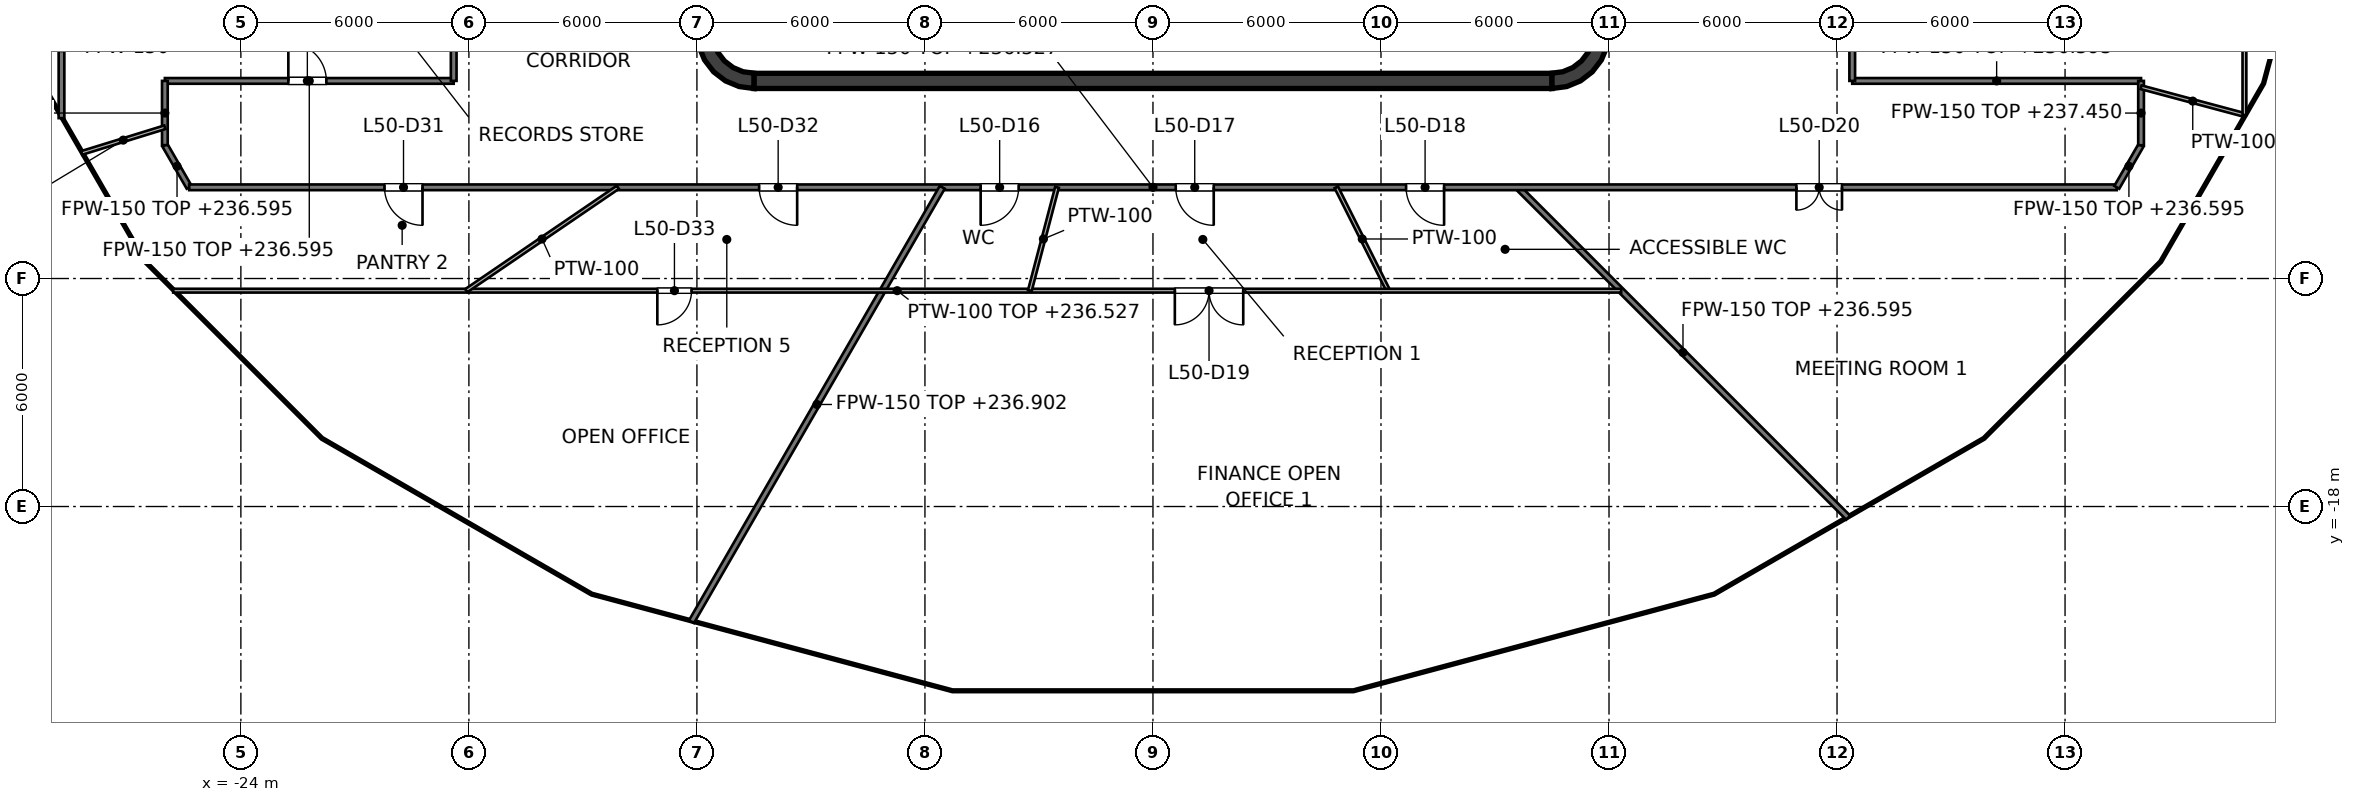
"""IFC4 building model, lengths in metres.
Left out: names, types, materials, properties, quantities, classifications, styles, units other than length and angle.
Written with IfcOpenShell. Run it as: python <this file> out.ifc"""

import sys

from ifc_helpers import new_model, si_unit, direction, frame, frame_2d, origin, place, context, subcontext, project, spatial, polyline, rectangle, outline, extrude, element, fill, save


model = new_model("IFC4")
c1 = context("Model", 3, precision=1e-05, world=origin(), true_north=direction((0.0, 1.0)))
c2 = subcontext(c1, "Body", "Model", "MODEL_VIEW")
j1 = project(units=[si_unit("LENGTHUNIT", "METRE"), si_unit("PLANEANGLEUNIT", "RADIAN")], contexts=[c1])
p1 = place(None, origin())
s1 = spatial("IfcSite", under=j1, at=p1, CompositionType="ELEMENT")
p2 = place(p1, origin())
s2 = spatial("IfcBuilding", under=s1, at=p2, CompositionType="ELEMENT")
p3 = place(p2, frame((0.0, 0.0, 233.6)))
s3 = spatial("IfcBuildingStorey", under=s2, at=p3, CompositionType="ELEMENT", Elevation=233.6)
p4 = place(p3, frame((-10.5, -6.8, 0.0), z_axis=(0.0, 0.0, 1.0), x_axis=(1.0, 0.0, 0.0)))
e1 = element("IfcWall", 1, at=p4, inside=s3, PredefinedType="SHEAR", context=c2, shape_type="SweptSolid", body=[
    extrude(rectangle(XDim=21.0, YDim=0.4, at=frame_2d((10.5, 0.0))), origin(), (0.0, 0.0, 1.0), 4.0),
])
p5 = place(p3, origin())
e2 = element("IfcWall", 2, at=p5, inside=s3, PredefinedType="SHEAR", context=c2, shape_type="SweptSolid", body=[
    extrude(outline(polyline([(-10.5, -7.0), (-10.5, -6.596), (-10.784, -6.559), (-11.048, -6.45), (-11.275, -6.275), (-11.45, -6.048), (-11.559, -5.784), (-11.596, -5.5), (-12.0, -5.5), (-11.949, -5.888), (-11.799, -6.25), (-11.561, -6.561), (-11.25, -6.799), (-10.888, -6.949), (-10.5, -7.0)])), origin(), (0.0, 0.0, 1.0), 4.0),
])
e3 = element("IfcWall", 3, at=p5, inside=s3, PredefinedType="SHEAR", context=c2, shape_type="SweptSolid", body=[
    extrude(outline(polyline([(12.0, -5.5), (11.596, -5.5), (11.559, -5.784), (11.45, -6.048), (11.275, -6.275), (11.048, -6.45), (10.784, -6.559), (10.5, -6.596), (10.5, -7.0), (10.888, -6.949), (11.25, -6.799), (11.561, -6.561), (11.799, -6.25), (11.949, -5.888), (12.0, -5.5)])), origin(), (0.0, 0.0, 1.0), 4.0),
])
p6 = place(p3, frame((9.0, -6.6, 0.0), z_axis=(0.0, 0.0, 1.0), x_axis=(0.0, 1.0, 0.0)))
e4 = element("IfcWall", 4, at=p6, inside=s3, PredefinedType="SOLIDWALL", context=c2, shape_type="SweptSolid", body=[
    extrude(rectangle(XDim=2.5, YDim=0.25, at=frame_2d((1.25, 0.0))), origin(), (0.0, 0.0, 1.0), 3.85),
])
p7 = place(p6, frame((0.65, 0.0, 0.0)))
e5 = element("IfcOpeningElement", 5, at=p7, cuts=e4, PredefinedType="OPENING", context=c2, shape_type="SweptSolid", body=[
    extrude(rectangle(XDim=1.2, YDim=2.1, at=frame_2d((0.6, 1.05))), frame((0.0, 0.125, 0.0), z_axis=(0.0, -1.0, 0.0), x_axis=(1.0, 0.0, 0.0)), (0.0, 0.0, 1.0), 0.25),
])
p8 = place(p3, frame((-9.0, -6.6, 0.0), z_axis=(0.0, 0.0, 1.0), x_axis=(0.0, 1.0, 0.0)))
e6 = element("IfcWall", 6, at=p8, inside=s3, PredefinedType="PARTITIONING", context=c2, shape_type="SweptSolid", body=[
    extrude(rectangle(XDim=2.5, YDim=0.25, at=frame_2d((1.25, 0.0))), origin(), (0.0, 0.0, 1.0), 3.85),
])
p9 = place(p8, frame((0.75, 0.0, 0.0)))
e7 = element("IfcOpeningElement", 7, at=p9, cuts=e6, PredefinedType="OPENING", context=c2, shape_type="SweptSolid", body=[
    extrude(rectangle(XDim=1.0, YDim=2.1, at=frame_2d((0.5, 1.05))), frame((0.0, 0.125, 0.0), z_axis=(0.0, -1.0, 0.0), x_axis=(1.0, 0.0, 0.0)), (0.0, 0.0, 1.0), 0.25),
])
p10 = place(p3, frame((3.15, -6.6, 0.0), z_axis=(0.0, 0.0, 1.0), x_axis=(0.0, 1.0, 0.0)))
e8 = element("IfcWall", 8, at=p10, inside=s3, PredefinedType="SOLIDWALL", context=c2, shape_type="SweptSolid", body=[
    extrude(rectangle(XDim=2.5, YDim=0.25, at=frame_2d((1.25, 0.0))), origin(), (0.0, 0.0, 1.0), 3.85),
])
p11 = place(p3, frame((-2.9, -6.6, 0.0), z_axis=(0.0, 0.0, 1.0), x_axis=(0.0, 1.0, 0.0)))
e9 = element("IfcWall", 9, at=p11, inside=s3, PredefinedType="PARTITIONING", context=c2, shape_type="SweptSolid", body=[
    extrude(rectangle(XDim=2.5, YDim=0.25, at=frame_2d((1.25, 0.0))), origin(), (0.0, 0.0, 1.0), 3.85),
])
p12 = place(p11, frame((0.8, 0.0, 0.0)))
e10 = element("IfcOpeningElement", 10, at=p12, cuts=e9, PredefinedType="OPENING", context=c2, shape_type="SweptSolid", body=[
    extrude(rectangle(XDim=0.9, YDim=2.1, at=frame_2d((0.45, 1.05))), frame((0.0, 0.125, 0.0), z_axis=(0.0, -1.0, 0.0), x_axis=(1.0, 0.0, 0.0)), (0.0, 0.0, 1.0), 0.25),
])
p13 = place(p3, frame((-26.0, -8.491, 0.0), z_axis=(0.0, 0.0, 1.0), x_axis=(0.499870984138, -0.866099878315, 0.0)))
e11 = element("IfcWall", 11, at=p13, inside=s3, PredefinedType="PARTITIONING", context=c2, shape_type="SweptSolid", body=[
    extrude(rectangle(XDim=1.281, YDim=0.15, at=frame_2d((0.64, 0.0))), origin(), (0.0, 0.0, 1.0), 2.995),
])
p14 = place(p3, frame((9.6, -9.6, 0.0), z_axis=(0.0, 0.0, 1.0), x_axis=(0.707106781187, -0.707106781187, 0.0)))
e12 = element("IfcWall", 12, at=p14, inside=s3, PredefinedType="PARTITIONING", context=c2, shape_type="SweptSolid", body=[
    extrude(rectangle(XDim=12.293, YDim=0.15, at=frame_2d((6.147, 0.0))), origin(), (0.0, 0.0, 1.0), 2.995),
])
p15 = place(p3, frame((-25.36, -9.6, 0.0), z_axis=(0.0, 0.0, 1.0), x_axis=(1.0, 0.0, 0.0)))
e13 = element("IfcWall", 13, at=p15, inside=s3, PredefinedType="PARTITIONING", context=c2, shape_type="SweptSolid", body=[
    extrude(rectangle(XDim=50.721, YDim=0.15, at=frame_2d((25.361, 0.0))), origin(), (0.0, 0.0, 1.0), 2.927),
])
p16 = place(p15, frame((20.826, 0.0, 0.0)))
e14 = element("IfcOpeningElement", 14, at=p16, cuts=e13, PredefinedType="OPENING", context=c2, shape_type="SweptSolid", body=[
    extrude(rectangle(XDim=1.0, YDim=2.1, at=frame_2d((0.5, 1.05))), frame((0.0, 0.075, 0.0), z_axis=(0.0, -1.0, 0.0), x_axis=(1.0, 0.0, 0.0)), (0.0, 0.0, 1.0), 0.15),
])
p17 = place(p15, frame((25.959, 0.0, 0.0)))
e15 = element("IfcOpeningElement", 15, at=p17, cuts=e13, PredefinedType="OPENING", context=c2, shape_type="SweptSolid", body=[
    extrude(rectangle(XDim=1.0, YDim=2.1, at=frame_2d((0.5, 1.05))), frame((0.0, 0.075, 0.0), z_axis=(0.0, -1.0, 0.0), x_axis=(1.0, 0.0, 0.0)), (0.0, 0.0, 1.0), 0.15),
])
p18 = place(p15, frame((32.021, 0.0, 0.0)))
e16 = element("IfcOpeningElement", 16, at=p18, cuts=e13, PredefinedType="OPENING", context=c2, shape_type="SweptSolid", body=[
    extrude(rectangle(XDim=1.0, YDim=2.1, at=frame_2d((0.5, 1.05))), frame((0.0, 0.075, 0.0), z_axis=(0.0, -1.0, 0.0), x_axis=(1.0, 0.0, 0.0)), (0.0, 0.0, 1.0), 0.15),
])
p19 = place(p15, frame((42.291, 0.0, 0.0)))
e17 = element("IfcOpeningElement", 17, at=p19, cuts=e13, PredefinedType="OPENING", context=c2, shape_type="SweptSolid", body=[
    extrude(rectangle(XDim=1.2, YDim=2.1, at=frame_2d((0.6, 1.05))), frame((0.0, 0.075, 0.0), z_axis=(0.0, -1.0, 0.0), x_axis=(1.0, 0.0, 0.0)), (0.0, 0.0, 1.0), 0.15),
])
p20 = place(p15, frame((5.139, 0.0, 0.0)))
e18 = element("IfcOpeningElement", 18, at=p20, cuts=e13, PredefinedType="OPENING", context=c2, shape_type="SweptSolid", body=[
    extrude(rectangle(XDim=1.0, YDim=2.1, at=frame_2d((0.5, 1.05))), frame((0.0, 0.075, 0.0), z_axis=(0.0, -1.0, 0.0), x_axis=(1.0, 0.0, 0.0)), (0.0, 0.0, 1.0), 0.15),
])
p21 = place(p15, frame((14.998, 0.0, 0.0)))
e19 = element("IfcOpeningElement", 19, at=p21, cuts=e13, PredefinedType="OPENING", context=c2, shape_type="SweptSolid", body=[
    extrude(rectangle(XDim=1.0, YDim=2.1, at=frame_2d((0.5, 1.05))), frame((0.0, 0.075, 0.0), z_axis=(0.0, -1.0, 0.0), x_axis=(1.0, 0.0, 0.0)), (0.0, 0.0, 1.0), 0.15),
])
p22 = place(p3, frame((-26.0, -6.8, 0.0), z_axis=(0.0, 0.0, 1.0), x_axis=(1.0, 0.0, 0.0)))
e20 = element("IfcWall", 20, at=p22, inside=s3, PredefinedType="PARTITIONING", context=c2, shape_type="SweptSolid", body=[
    extrude(rectangle(XDim=7.6, YDim=0.15, at=frame_2d((3.8, 0.0))), origin(), (0.0, 0.0, 1.0), 2.995),
])
p23 = place(p22, frame((3.249, 0.0, 0.0)))
e21 = element("IfcOpeningElement", 21, at=p23, cuts=e20, PredefinedType="OPENING", context=c2, shape_type="SweptSolid", body=[
    extrude(rectangle(XDim=1.0, YDim=2.1, at=frame_2d((0.5, 1.05))), frame((0.0, 0.075, 0.0), z_axis=(0.0, -1.0, 0.0), x_axis=(1.0, 0.0, 0.0)), (0.0, 0.0, 1.0), 0.15),
])
p24 = place(p3, frame((18.4, -6.8, 0.0), z_axis=(0.0, 0.0, 1.0), x_axis=(1.0, 0.0, 0.0)))
e22 = element("IfcWall", 22, at=p24, inside=s3, PredefinedType="PARTITIONING", context=c2, shape_type="SweptSolid", body=[
    extrude(rectangle(XDim=7.6, YDim=0.15, at=frame_2d((3.8, 0.0))), origin(), (0.0, 0.0, 1.0), 2.995),
])
p25 = place(p3, frame((25.361, -9.6, 0.0), z_axis=(0.0, 0.0, 1.0), x_axis=(0.499816142895, 0.866131527715, 0.0)))
e23 = element("IfcWall", 23, at=p25, inside=s3, PredefinedType="PARTITIONING", context=c2, shape_type="SweptSolid", body=[
    extrude(rectangle(XDim=1.278, YDim=0.15, at=frame_2d((0.639, 0.0))), origin(), (0.0, 0.0, 1.0), 2.995),
])
p26 = place(p3, frame((-12.142, -21.03, 0.0), z_axis=(0.0, 0.0, 1.0), x_axis=(0.499931154021, 0.86606514838, 0.0)))
e24 = element("IfcWall", 24, at=p26, inside=s3, PredefinedType="PARTITIONING", context=c2, shape_type="SweptSolid", body=[
    extrude(rectangle(XDim=13.198, YDim=0.15, at=frame_2d((6.599, 0.0))), origin(), (0.0, 0.0, 1.0), 3.302),
])
p27 = place(p3, frame((26.0, -8.493, 0.0), z_axis=(0.0, 0.0, 1.0), x_axis=(0.0, 1.0, 0.0)))
e25 = element("IfcWall", 25, at=p27, inside=s3, PredefinedType="PARTITIONING", context=c2, shape_type="SweptSolid", body=[
    extrude(rectangle(XDim=1.693, YDim=0.15, at=frame_2d((0.846, 0.0))), origin(), (0.0, 0.0, 1.0), 3.85),
])
p28 = place(p3, frame((18.4, -6.8, 0.0), z_axis=(0.0, 0.0, 1.0), x_axis=(0.0, 1.0, 0.0)))
e26 = element("IfcWall", 26, at=p28, inside=s3, PredefinedType="PARTITIONING", context=c2, shape_type="SweptSolid", body=[
    extrude(rectangle(XDim=13.6, YDim=0.15, at=frame_2d((6.8, 0.0))), origin(), (0.0, 0.0, 1.0), 2.918),
])
p29 = place(p28, frame((6.2, 0.0, 0.0)))
e27 = element("IfcOpeningElement", 27, at=p29, cuts=e26, PredefinedType="OPENING", context=c2, shape_type="SweptSolid", body=[
    extrude(rectangle(XDim=1.2, YDim=2.1, at=frame_2d((0.6, 1.05))), frame((0.0, 0.075, 0.0), z_axis=(0.0, -1.0, 0.0), x_axis=(1.0, 0.0, 0.0)), (0.0, 0.0, 1.0), 0.15),
])
p30 = place(p3, frame((-18.4, -6.8, 0.0), z_axis=(0.0, 0.0, 1.0), x_axis=(0.0, 1.0, 0.0)))
e28 = element("IfcWall", 28, at=p30, inside=s3, PredefinedType="PARTITIONING", context=c2, shape_type="SweptSolid", body=[
    extrude(rectangle(XDim=13.6, YDim=0.15, at=frame_2d((6.8, 0.0))), origin(), (0.0, 0.0, 1.0), 2.918),
])
p31 = place(p3, frame((-26.0, -8.491, 0.0), z_axis=(0.0, 0.0, 1.0), x_axis=(0.0, 1.0, 0.0)))
e29 = element("IfcWall", 29, at=p31, inside=s3, PredefinedType="PARTITIONING", context=c2, shape_type="SweptSolid", body=[
    extrude(rectangle(XDim=1.691, YDim=0.15, at=frame_2d((0.845, 0.0))), origin(), (0.0, 0.0, 1.0), 3.85),
])
p32 = place(p3, frame((-28.72, -7.78, 0.0), z_axis=(0.0, 0.0, 1.0), x_axis=(0.0, 1.0, 0.0)))
e30 = element("IfcWall", 30, at=p32, inside=s3, PredefinedType="PARTITIONING", context=c2, shape_type="SweptSolid", body=[
    extrude(rectangle(XDim=3.7, YDim=0.15, at=frame_2d((1.85, 0.0))), origin(), (0.0, 0.0, 1.0), 2.918),
])
p33 = place(p3, frame((4.824, -9.6, 0.0), z_axis=(0.0, 0.0, 1.0), x_axis=(0.449041226729, -0.893511038934, 0.0)))
e31 = element("IfcWall", 31, at=p33, inside=s3, PredefinedType="PARTITIONING", context=c2, shape_type="SweptSolid", body=[
    extrude(rectangle(XDim=3.044, YDim=0.1, at=frame_2d((1.522, 0.0))), origin(), (0.0, 0.0, 1.0), 3.85),
])
p34 = place(p3, frame((26.0, -6.967, 0.0), z_axis=(0.0, 0.0, 1.0), x_axis=(0.965908960342, -0.258881981472, 0.0)))
e32 = element("IfcWall", 32, at=p34, inside=s3, PredefinedType="PARTITIONING", context=c2, shape_type="SweptSolid", body=[
    extrude(rectangle(XDim=2.816, YDim=0.1, at=frame_2d((1.408, 0.0))), origin(), (0.0, 0.0, 1.0), 3.527),
])
p35 = place(p3, frame((-25.781, -12.32, 0.0), z_axis=(0.0, 0.0, 1.0), x_axis=(1.0, 0.0, 0.0)))
e33 = element("IfcWall", 33, at=p35, inside=s3, PredefinedType="PARTITIONING", context=c2, shape_type="SweptSolid", body=[
    extrude(rectangle(XDim=38.101, YDim=0.1, at=frame_2d((19.051, 0.0))), origin(), (0.0, 0.0, 1.0), 2.927),
])
p36 = place(p35, frame((26.356, 0.0, 0.0)))
e34 = element("IfcOpeningElement", 34, at=p36, cuts=e33, PredefinedType="OPENING", context=c2, shape_type="SweptSolid", body=[
    extrude(rectangle(XDim=1.8, YDim=2.1, at=frame_2d((0.9, 1.05))), frame((0.0, 0.05, 0.0), z_axis=(0.0, -1.0, 0.0), x_axis=(1.0, 0.0, 0.0)), (0.0, 0.0, 1.0), 0.1),
])
p37 = place(p35, frame((12.74, 0.0, 0.0)))
e35 = element("IfcOpeningElement", 35, at=p37, cuts=e33, PredefinedType="OPENING", context=c2, shape_type="SweptSolid", body=[
    extrude(rectangle(XDim=0.9, YDim=2.1, at=frame_2d((0.45, 1.05))), frame((0.0, 0.05, 0.0), z_axis=(0.0, -1.0, 0.0), x_axis=(1.0, 0.0, 0.0)), (0.0, 0.0, 1.0), 0.1),
])
p38 = place(p3, frame((-28.191, -8.696, 0.0), z_axis=(0.0, 0.0, 1.0), x_axis=(0.955546181959, 0.294841472904, 0.0)))
e36 = element("IfcWall", 36, at=p38, inside=s3, PredefinedType="PARTITIONING", context=c2, shape_type="SweptSolid", body=[
    extrude(rectangle(XDim=2.293, YDim=0.1, at=frame_2d((1.146, 0.0))), origin(), (0.0, 0.0, 1.0), 3.527),
])
p39 = place(p3, frame((-18.07, -12.32, 0.0), z_axis=(0.0, 0.0, 1.0), x_axis=(0.826209155485, 0.563363498455, 0.0)))
e37 = element("IfcWall", 37, at=p39, inside=s3, PredefinedType="PARTITIONING", context=c2, shape_type="SweptSolid", body=[
    extrude(rectangle(XDim=4.828, YDim=0.1, at=frame_2d((2.414, 0.0))), origin(), (0.0, 0.0, 1.0), 3.85),
])
p40 = place(p3, frame((-3.24, -12.32, 0.0), z_axis=(0.0, 0.0, 1.0), x_axis=(0.254262551931, 0.967135230816, 0.0)))
e38 = element("IfcWall", 38, at=p40, inside=s3, PredefinedType="PARTITIONING", context=c2, shape_type="SweptSolid", body=[
    extrude(rectangle(XDim=2.812, YDim=0.1, at=frame_2d((1.406, 0.0))), origin(), (0.0, 0.0, 1.0), 3.85),
])
p41 = place(p3, frame((28.72, -7.696, 0.0), z_axis=(0.0, 0.0, 1.0), x_axis=(0.0, 1.0, 0.0)))
e39 = element("IfcWall", 39, at=p41, inside=s3, PredefinedType="PARTITIONING", context=c2, shape_type="SweptSolid", body=[
    extrude(rectangle(XDim=3.616, YDim=0.1, at=frame_2d((1.808, 0.0))), origin(), (0.0, 0.0, 1.0), 2.918),
])
p42 = place(p16, origin())
e40 = element("IfcDoor", 40, at=p42, inside=s3, OperationType="SINGLE_SWING_LEFT", PredefinedType="DOOR", context=c2, shape_type="SweptSolid", body=[
    extrude(rectangle(XDim=1.0, YDim=2.1, at=frame_2d((0.5, 1.05))), frame((0.0, 0.025, 0.0), z_axis=(0.0, -1.0, 0.0), x_axis=(1.0, 0.0, 0.0)), (0.0, 0.0, 1.0), 0.05),
])
fill(e14, e40)
p43 = place(p17, origin())
e41 = element("IfcDoor", 41, at=p43, inside=s3, OperationType="SINGLE_SWING_RIGHT", PredefinedType="DOOR", context=c2, shape_type="SweptSolid", body=[
    extrude(rectangle(XDim=1.0, YDim=2.1, at=frame_2d((0.5, 1.05))), frame((0.0, 0.025, 0.0), z_axis=(0.0, -1.0, 0.0), x_axis=(1.0, 0.0, 0.0)), (0.0, 0.0, 1.0), 0.05),
])
fill(e15, e41)
p44 = place(p18, origin())
e42 = element("IfcDoor", 42, at=p44, inside=s3, OperationType="SINGLE_SWING_RIGHT", PredefinedType="DOOR", context=c2, shape_type="SweptSolid", body=[
    extrude(rectangle(XDim=1.0, YDim=2.1, at=frame_2d((0.5, 1.05))), frame((0.0, 0.025, 0.0), z_axis=(0.0, -1.0, 0.0), x_axis=(1.0, 0.0, 0.0)), (0.0, 0.0, 1.0), 0.05),
])
fill(e16, e42)
p45 = place(p36, origin())
e43 = element("IfcDoor", 43, at=p45, inside=s3, OperationType="DOUBLE_DOOR_SINGLE_SWING", PredefinedType="DOOR", context=c2, shape_type="SweptSolid", body=[
    extrude(rectangle(XDim=1.8, YDim=2.1, at=frame_2d((0.9, 1.05))), frame((0.0, 0.025, 0.0), z_axis=(0.0, -1.0, 0.0), x_axis=(1.0, 0.0, 0.0)), (0.0, 0.0, 1.0), 0.05),
])
fill(e34, e43)
p46 = place(p19, origin())
e44 = element("IfcDoor", 44, at=p46, inside=s3, OperationType="DOUBLE_DOOR_SINGLE_SWING", PredefinedType="DOOR", context=c2, shape_type="SweptSolid", body=[
    extrude(rectangle(XDim=1.2, YDim=2.1, at=frame_2d((0.6, 1.05))), frame((0.0, 0.025, 0.0), z_axis=(0.0, -1.0, 0.0), x_axis=(1.0, 0.0, 0.0)), (0.0, 0.0, 1.0), 0.05),
])
fill(e17, e44)
p47 = place(p23, origin())
e45 = element("IfcDoor", 45, at=p47, inside=s3, OperationType="SINGLE_SWING_LEFT", PredefinedType="DOOR", context=c2, shape_type="SweptSolid", body=[
    extrude(rectangle(XDim=1.0, YDim=2.1, at=frame_2d((0.5, 1.05))), frame((0.0, 0.025, 0.0), z_axis=(0.0, -1.0, 0.0), x_axis=(1.0, 0.0, 0.0)), (0.0, 0.0, 1.0), 0.05),
])
fill(e21, e45)
p48 = place(p20, origin())
e46 = element("IfcDoor", 46, at=p48, inside=s3, OperationType="SINGLE_SWING_RIGHT", PredefinedType="DOOR", context=c2, shape_type="SweptSolid", body=[
    extrude(rectangle(XDim=1.0, YDim=2.1, at=frame_2d((0.5, 1.05))), frame((0.0, 0.025, 0.0), z_axis=(0.0, -1.0, 0.0), x_axis=(1.0, 0.0, 0.0)), (0.0, 0.0, 1.0), 0.05),
])
fill(e18, e46)
p49 = place(p21, origin())
e47 = element("IfcDoor", 47, at=p49, inside=s3, OperationType="SINGLE_SWING_RIGHT", PredefinedType="DOOR", context=c2, shape_type="SweptSolid", body=[
    extrude(rectangle(XDim=1.0, YDim=2.1, at=frame_2d((0.5, 1.05))), frame((0.0, 0.025, 0.0), z_axis=(0.0, -1.0, 0.0), x_axis=(1.0, 0.0, 0.0)), (0.0, 0.0, 1.0), 0.05),
])
fill(e19, e47)
p50 = place(p37, origin())
e48 = element("IfcDoor", 48, at=p50, inside=s3, OperationType="SINGLE_SWING_LEFT", PredefinedType="DOOR", context=c2, shape_type="SweptSolid", body=[
    extrude(rectangle(XDim=0.9, YDim=2.1, at=frame_2d((0.45, 1.05))), frame((0.0, 0.025, 0.0), z_axis=(0.0, -1.0, 0.0), x_axis=(1.0, 0.0, 0.0)), (0.0, 0.0, 1.0), 0.05),
])
fill(e35, e48)
save(model, sys.argv[1])
